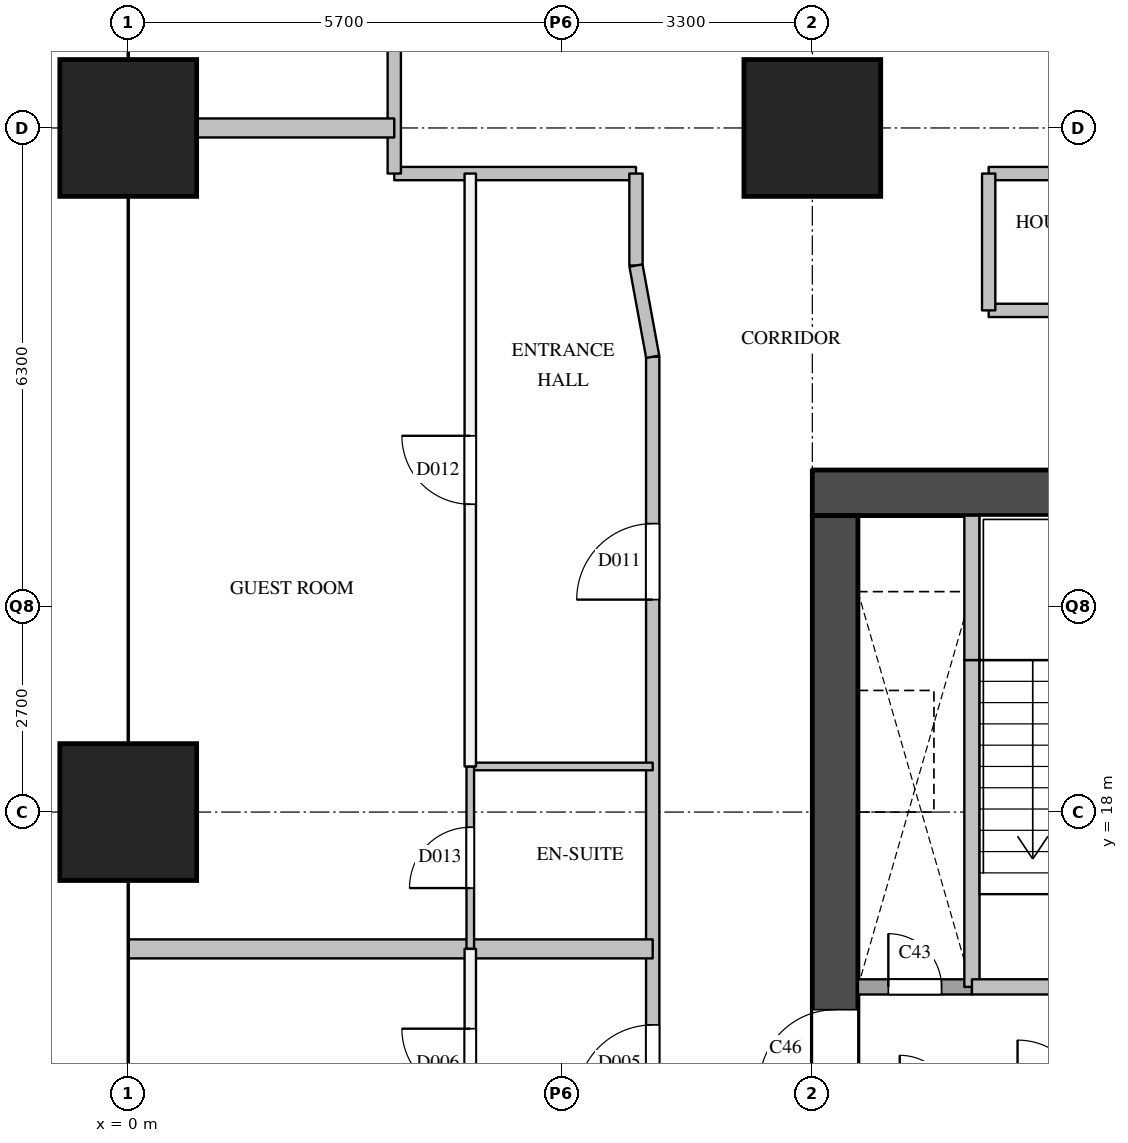
"""IFC4 building model, lengths in metres.
Left out: names, types, materials, properties, quantities, classifications, styles, units other than length and angle.
Written with IfcOpenShell. Run it as: python <this file> out.ifc"""

import sys

from ifc_helpers import new_model, si_unit, direction, frame, frame_2d, origin, origin_2d, place, context, subcontext, project, spatial, rectangle, extrude, element, fill, save


model = new_model("IFC4")
c1 = context("Model", 3, precision=1e-05, world=origin(), true_north=direction((0.0, 1.0)))
c2 = subcontext(c1, "Body", "Model", "MODEL_VIEW")
j1 = project(units=[si_unit("LENGTHUNIT", "METRE"), si_unit("PLANEANGLEUNIT", "RADIAN")], contexts=[c1])
p1 = place(None, origin())
s1 = spatial("IfcSite", under=j1, at=p1, CompositionType="ELEMENT")
p2 = place(p1, origin())
s2 = spatial("IfcBuilding", under=s1, at=p2, CompositionType="ELEMENT")
p3 = place(p2, frame((0.0, 0.0, 61.4)))
s3 = spatial("IfcBuildingStorey", under=s2, at=p3, CompositionType="ELEMENT", Elevation=61.4)
for number, where, z_axis, x_axis in (
    (1, (0.0, 18.0, 0.0), (0.0, 0.0, 1.0), (1.0, 0.0, 0.0)),
    (2, (0.0, 27.0, 0.0), (0.0, 0.0, 1.0), (1.0, 0.0, 0.0)),
    (3, (9.0, 27.0, 0.0), (0.0, 0.0, 1.0), (1.0, 0.0, 0.0)),
):
    element("IfcColumn", number, at=place(p3, frame(where, z_axis=z_axis, x_axis=x_axis)), inside=s3, PredefinedType="COLUMN", context=c2, shape_type="SweptSolid", body=[
        extrude(rectangle(XDim=1.8, YDim=1.8, at=origin_2d()), origin(), (0.0, 0.0, 1.0), 3.8),
    ])
p4 = place(p3, frame((9.0, 22.2, 0.0), z_axis=(0.0, 0.0, 1.0), x_axis=(1.0, 0.0, 0.0)))
e4 = element("IfcWall", 4, at=p4, inside=s3, PredefinedType="SHEAR", context=c2, shape_type="SweptSolid", body=[
    extrude(rectangle(XDim=9.0, YDim=0.6, at=frame_2d((4.5, 0.0))), origin(), (0.0, 0.0, 1.0), 3.5),
])
p5 = place(p3, frame((9.3, 9.6, 0.0), z_axis=(0.0, 0.0, 1.0), x_axis=(0.0, 1.0, 0.0)))
e5 = element("IfcWall", 5, at=p5, inside=s3, PredefinedType="SHEAR", context=c2, shape_type="SweptSolid", body=[
    extrude(rectangle(XDim=12.3, YDim=0.6, at=frame_2d((6.15, 0.0))), origin(), (0.0, 0.0, 1.0), 3.5),
])
p6 = place(p5, frame((0.8, 0.0, 0.0)))
e6 = element("IfcOpeningElement", 6, at=p6, cuts=e5, PredefinedType="OPENING", context=c2, shape_type="SweptSolid", body=[
    extrude(rectangle(XDim=0.7, YDim=2.1, at=frame_2d((0.35, 1.05))), frame((0.0, 0.31, 0.0), z_axis=(0.0, -1.0, 0.0), x_axis=(1.0, 0.0, 0.0)), (0.0, 0.0, 1.0), 0.62),
])
p7 = place(p5, frame((4.8, 0.0, 0.0)))
e7 = element("IfcOpeningElement", 7, at=p7, cuts=e5, PredefinedType="OPENING", context=c2, shape_type="SweptSolid", body=[
    extrude(rectangle(XDim=1.0, YDim=2.1, at=frame_2d((0.5, 1.05))), frame((0.0, 0.31, 0.0), z_axis=(0.0, -1.0, 0.0), x_axis=(1.0, 0.0, 0.0)), (0.0, 0.0, 1.0), 0.62),
])
p8 = place(p3, frame((11.1, 15.7, 0.0), z_axis=(0.0, 0.0, 1.0), x_axis=(0.0, 1.0, 0.0)))
e8 = element("IfcWall", 8, at=p8, inside=s3, PredefinedType="SOLIDWALL", context=c2, shape_type="SweptSolid", body=[
    extrude(rectangle(XDim=4.3, YDim=0.2, at=frame_2d((2.15, 0.0))), origin(), (0.0, 0.0, 1.0), 3.5),
])
p9 = place(p3, frame((11.1, 20.0, 0.0), z_axis=(0.0, 0.0, 1.0), x_axis=(0.0, 1.0, 0.0)))
e9 = element("IfcWall", 9, at=p9, inside=s3, PredefinedType="SOLIDWALL", context=c2, shape_type="SweptSolid", body=[
    extrude(rectangle(XDim=1.9, YDim=0.2, at=frame_2d((0.95, 0.0))), origin(), (0.0, 0.0, 1.0), 3.5),
])
p10 = place(p3, frame((9.6, 15.7, 0.0), z_axis=(0.0, 0.0, 1.0), x_axis=(1.0, 0.0, 0.0)))
e10 = element("IfcWall", 10, at=p10, inside=s3, PredefinedType="SOLIDWALL", context=c2, shape_type="SweptSolid", body=[
    extrude(rectangle(XDim=1.5, YDim=0.2, at=frame_2d((0.75, 0.0))), origin(), (0.0, 0.0, 1.0), 3.5),
])
p11 = place(p10, frame((0.4, 0.0, 0.0)))
e11 = element("IfcOpeningElement", 11, at=p11, cuts=e10, PredefinedType="OPENING", context=c2, shape_type="SweptSolid", body=[
    extrude(rectangle(XDim=0.7, YDim=2.1, at=frame_2d((0.35, 1.05))), frame((0.0, 0.11, 0.0), z_axis=(0.0, -1.0, 0.0), x_axis=(1.0, 0.0, 0.0)), (0.0, 0.0, 1.0), 0.22),
])
p12 = place(p3, frame((11.1, 15.7, 0.0), z_axis=(0.0, 0.0, 1.0), x_axis=(1.0, 0.0, 0.0)))
e12 = element("IfcWall", 12, at=p12, inside=s3, PredefinedType="SOLIDWALL", context=c2, shape_type="SweptSolid", body=[
    extrude(rectangle(XDim=6.3, YDim=0.2, at=frame_2d((3.15, 0.0))), origin(), (0.0, 0.0, 1.0), 3.5),
])
p13 = place(p12, frame((4.175, 0.0, 0.0)))
e13 = element("IfcOpeningElement", 13, at=p13, cuts=e12, PredefinedType="OPENING", context=c2, shape_type="SweptSolid", body=[
    extrude(rectangle(XDim=1.1, YDim=2.1, at=frame_2d((0.55, 1.05))), frame((0.0, 0.11, 0.0), z_axis=(0.0, -1.0, 0.0), x_axis=(1.0, 0.0, 0.0)), (0.0, 0.0, 1.0), 0.22),
])
p14 = place(p12, frame((1.025, 0.0, 0.0)))
e14 = element("IfcOpeningElement", 14, at=p14, cuts=e12, PredefinedType="OPENING", context=c2, shape_type="SweptSolid", body=[
    extrude(rectangle(XDim=1.1, YDim=2.1, at=frame_2d((0.55, 1.05))), frame((0.0, 0.11, 0.0), z_axis=(0.0, -1.0, 0.0), x_axis=(1.0, 0.0, 0.0)), (0.0, 0.0, 1.0), 0.22),
])
p15 = place(p3, frame((11.32, 24.6, 0.0), z_axis=(0.0, 0.0, 1.0), x_axis=(1.0, 0.0, 0.0)))
e15 = element("IfcWall", 15, at=p15, inside=s3, PredefinedType="PARTITIONING", context=c2, shape_type="SweptSolid", body=[
    extrude(rectangle(XDim=4.36, YDim=0.175, at=frame_2d((2.18, 0.0))), origin(), (0.0, 0.0, 1.0), 3.5),
])
p16 = place(p15, frame((1.68, 0.0, 0.0)))
e16 = element("IfcOpeningElement", 16, at=p16, cuts=e15, PredefinedType="OPENING", context=c2, shape_type="SweptSolid", body=[
    extrude(rectangle(XDim=1.0, YDim=2.1, at=frame_2d((0.5, 1.05))), frame((0.0, 0.097, 0.0), z_axis=(0.0, -1.0, 0.0), x_axis=(1.0, 0.0, 0.0)), (0.0, 0.0, 1.0), 0.195),
])
p17 = place(p3, frame((3.5, 26.4, 0.0), z_axis=(0.0, 0.0, 1.0), x_axis=(1.0, 0.0, 0.0)))
e17 = element("IfcWall", 17, at=p17, inside=s3, PredefinedType="PARTITIONING", context=c2, shape_type="SweptSolid", body=[
    extrude(rectangle(XDim=3.18, YDim=0.175, at=frame_2d((1.59, 0.0))), origin(), (0.0, 0.0, 1.0), 3.5),
])
p18 = place(p3, frame((11.32, 26.4, 0.0), z_axis=(0.0, 0.0, 1.0), x_axis=(1.0, 0.0, 0.0)))
e18 = element("IfcWall", 18, at=p18, inside=s3, PredefinedType="PARTITIONING", context=c2, shape_type="SweptSolid", body=[
    extrude(rectangle(XDim=4.36, YDim=0.175, at=frame_2d((2.18, 0.0))), origin(), (0.0, 0.0, 1.0), 3.5),
])
p19 = place(p3, frame((3.5, 26.4, 0.0), z_axis=(0.0, 0.0, 1.0), x_axis=(0.0, 1.0, 0.0)))
e19 = element("IfcWall", 19, at=p19, inside=s3, PredefinedType="PARTITIONING", context=c2, shape_type="SweptSolid", body=[
    extrude(rectangle(XDim=25.7, YDim=0.175, at=frame_2d((12.85, 0.0))), origin(), (0.0, 0.0, 1.0), 2.5),
])
p20 = place(p19, frame((12.7, 0.0, 0.0)))
e20 = element("IfcOpeningElement", 20, at=p20, cuts=e19, PredefinedType="OPENING", context=c2, shape_type="SweptSolid", body=[
    extrude(rectangle(XDim=0.9, YDim=2.1, at=frame_2d((0.45, 1.05))), frame((0.0, 0.097, 0.0), z_axis=(0.0, -1.0, 0.0), x_axis=(1.0, 0.0, 0.0)), (0.0, 0.0, 1.0), 0.195),
])
p21 = place(p3, frame((6.68, 25.19, 0.0), z_axis=(0.0, 0.0, 1.0), x_axis=(0.0, 1.0, 0.0)))
e21 = element("IfcWall", 21, at=p21, inside=s3, PredefinedType="PARTITIONING", context=c2, shape_type="SweptSolid", body=[
    extrude(rectangle(XDim=1.21, YDim=0.175, at=frame_2d((0.605, 0.0))), origin(), (0.0, 0.0, 1.0), 3.5),
])
p22 = place(p3, frame((6.9, 6.9, 0.0), z_axis=(0.0, 0.0, 1.0), x_axis=(0.0, 1.0, 0.0)))
e22 = element("IfcWall", 22, at=p22, inside=s3, PredefinedType="PARTITIONING", context=c2, shape_type="SweptSolid", body=[
    extrude(rectangle(XDim=17.09, YDim=0.175, at=frame_2d((8.545, 0.0))), origin(), (0.0, 0.0, 1.0), 3.5),
])
p23 = place(p22, frame((7.3, 0.0, 0.0)))
e23 = element("IfcOpeningElement", 23, at=p23, cuts=e22, PredefinedType="OPENING", context=c2, shape_type="SweptSolid", body=[
    extrude(rectangle(XDim=1.0, YDim=2.1, at=frame_2d((0.5, 1.05))), frame((0.0, 0.097, 0.0), z_axis=(0.0, -1.0, 0.0), x_axis=(1.0, 0.0, 0.0)), (0.0, 0.0, 1.0), 0.195),
])
p24 = place(p22, frame((13.895, 0.0, 0.0)))
e24 = element("IfcOpeningElement", 24, at=p24, cuts=e22, PredefinedType="OPENING", context=c2, shape_type="SweptSolid", body=[
    extrude(rectangle(XDim=1.0, YDim=2.1, at=frame_2d((0.5, 1.05))), frame((0.0, 0.097, 0.0), z_axis=(0.0, -1.0, 0.0), x_axis=(1.0, 0.0, 0.0)), (0.0, 0.0, 1.0), 0.195),
])
p25 = place(p3, frame((11.32, 24.6, 0.0), z_axis=(0.0, 0.0, 1.0), x_axis=(0.0, 1.0, 0.0)))
e25 = element("IfcWall", 25, at=p25, inside=s3, PredefinedType="PARTITIONING", context=c2, shape_type="SweptSolid", body=[
    extrude(rectangle(XDim=1.8, YDim=0.175, at=frame_2d((0.9, 0.0))), origin(), (0.0, 0.0, 1.0), 3.5),
])
p26 = place(p3, frame((4.5, 13.2, 0.0), z_axis=(0.0, 0.0, 1.0), x_axis=(0.0, 1.0, 0.0)))
e26 = element("IfcWall", 26, at=p26, inside=s3, PredefinedType="PARTITIONING", context=c2, shape_type="SweptSolid", body=[
    extrude(rectangle(XDim=3.0, YDim=0.15, at=frame_2d((1.5, 0.0))), origin(), (0.0, 0.0, 1.0), 3.5),
])
p27 = place(p26, frame((1.05, 0.0, 0.0)))
e27 = element("IfcOpeningElement", 27, at=p27, cuts=e26, PredefinedType="OPENING", context=c2, shape_type="SweptSolid", body=[
    extrude(rectangle(XDim=0.9, YDim=2.1, at=frame_2d((0.45, 1.05))), frame((0.0, 0.085, 0.0), z_axis=(0.0, -1.0, 0.0), x_axis=(1.0, 0.0, 0.0)), (0.0, 0.0, 1.0), 0.17),
])
p28 = place(p3, frame((4.5, 18.6, 0.0), z_axis=(0.0, 0.0, 1.0), x_axis=(0.0, 1.0, 0.0)))
e28 = element("IfcWall", 28, at=p28, inside=s3, PredefinedType="PARTITIONING", context=c2, shape_type="SweptSolid", body=[
    extrude(rectangle(XDim=7.8, YDim=0.15, at=frame_2d((3.9, 0.0))), origin(), (0.0, 0.0, 1.0), 3.5),
])
p29 = place(p28, frame((3.45, 0.0, 0.0)))
e29 = element("IfcOpeningElement", 29, at=p29, cuts=e28, PredefinedType="OPENING", context=c2, shape_type="SweptSolid", body=[
    extrude(rectangle(XDim=0.9, YDim=2.1, at=frame_2d((0.45, 1.05))), frame((0.0, 0.085, 0.0), z_axis=(0.0, -1.0, 0.0), x_axis=(1.0, 0.0, 0.0)), (0.0, 0.0, 1.0), 0.17),
])
p30 = place(p3, frame((0.0, 16.2, 0.0), z_axis=(0.0, 0.0, 1.0), x_axis=(1.0, 0.0, 0.0)))
e30 = element("IfcWall", 30, at=p30, inside=s3, PredefinedType="PARTITIONING", context=c2, shape_type="SweptSolid", body=[
    extrude(rectangle(XDim=6.9, YDim=0.25, at=frame_2d((3.45, 0.0))), origin(), (0.0, 0.0, 1.0), 2.5),
])
p31 = place(p3, frame((0.0, 27.0, 0.0), z_axis=(0.0, 0.0, 1.0), x_axis=(1.0, 0.0, 0.0)))
e31 = element("IfcWall", 31, at=p31, inside=s3, PredefinedType="PARTITIONING", context=c2, shape_type="SweptSolid", body=[
    extrude(rectangle(XDim=3.5, YDim=0.25, at=frame_2d((1.75, 0.0))), origin(), (0.0, 0.0, 1.0), 2.5),
])
p32 = place(p3, frame((4.5, 18.6, 0.0), z_axis=(0.0, 0.0, 1.0), x_axis=(1.0, 0.0, 0.0)))
e32 = element("IfcWall", 32, at=p32, inside=s3, PredefinedType="PARTITIONING", context=c2, shape_type="SweptSolid", body=[
    extrude(rectangle(XDim=2.4, YDim=0.1, at=frame_2d((1.2, 0.0))), origin(), (0.0, 0.0, 1.0), 3.5),
])
p33 = place(p3, frame((4.5, 16.2, 0.0), z_axis=(0.0, 0.0, 1.0), x_axis=(0.0, 1.0, 0.0)))
e33 = element("IfcWall", 33, at=p33, inside=s3, PredefinedType="PARTITIONING", context=c2, shape_type="SweptSolid", body=[
    extrude(rectangle(XDim=2.4, YDim=0.1, at=frame_2d((1.2, 0.0))), origin(), (0.0, 0.0, 1.0), 3.5),
])
p34 = place(p33, frame((0.8, 0.0, 0.0)))
e34 = element("IfcOpeningElement", 34, at=p34, cuts=e33, PredefinedType="OPENING", context=c2, shape_type="SweptSolid", body=[
    extrude(rectangle(XDim=0.8, YDim=2.1, at=frame_2d((0.4, 1.05))), frame((0.0, 0.06, 0.0), z_axis=(0.0, -1.0, 0.0), x_axis=(1.0, 0.0, 0.0)), (0.0, 0.0, 1.0), 0.12),
])
p35 = place(p3, frame((6.9, 23.99, 0.0), z_axis=(0.0, 0.0, 1.0), x_axis=(-0.180311734132, 0.983609515272, 0.0)))
e35 = element("IfcWall", 35, at=p35, inside=s3, PredefinedType="PARTITIONING", context=c2, shape_type="SweptSolid", body=[
    extrude(rectangle(XDim=1.22, YDim=0.175, at=frame_2d((0.61, 0.0))), origin(), (0.0, 0.0, 1.0), 3.5),
])
p36 = place(p11, origin())
e36 = element("IfcDoor", 36, at=p36, inside=s3, OperationType="SINGLE_SWING_LEFT", PredefinedType="DOOR", context=c2, shape_type="SweptSolid", body=[
    extrude(rectangle(XDim=0.7, YDim=2.1, at=frame_2d((0.35, 1.05))), frame((0.0, 0.025, 0.0), z_axis=(0.0, -1.0, 0.0), x_axis=(1.0, 0.0, 0.0)), (0.0, 0.0, 1.0), 0.05),
])
fill(e11, e36)
p37 = place(p7, origin())
e37 = element("IfcDoor", 37, at=p37, inside=s3, OperationType="SINGLE_SWING_LEFT", PredefinedType="DOOR", context=c2, shape_type="SweptSolid", body=[
    extrude(rectangle(XDim=1.0, YDim=2.1, at=frame_2d((0.5, 1.05))), frame((0.0, 0.025, 0.0), z_axis=(0.0, -1.0, 0.0), x_axis=(1.0, 0.0, 0.0)), (0.0, 0.0, 1.0), 0.05),
])
fill(e7, e37)
p38 = place(p23, origin())
e38 = element("IfcDoor", 38, at=p38, inside=s3, OperationType="SINGLE_SWING_LEFT", PredefinedType="DOOR", context=c2, shape_type="SweptSolid", body=[
    extrude(rectangle(XDim=1.0, YDim=2.1, at=frame_2d((0.5, 1.05))), frame((0.0, 0.025, 0.0), z_axis=(0.0, -1.0, 0.0), x_axis=(1.0, 0.0, 0.0)), (0.0, 0.0, 1.0), 0.05),
])
fill(e23, e38)
p39 = place(p27, origin())
e39 = element("IfcDoor", 39, at=p39, inside=s3, OperationType="SINGLE_SWING_RIGHT", PredefinedType="DOOR", context=c2, shape_type="SweptSolid", body=[
    extrude(rectangle(XDim=0.9, YDim=2.1, at=frame_2d((0.45, 1.05))), frame((0.0, 0.025, 0.0), z_axis=(0.0, -1.0, 0.0), x_axis=(1.0, 0.0, 0.0)), (0.0, 0.0, 1.0), 0.05),
])
fill(e27, e39)
p40 = place(p24, origin())
e40 = element("IfcDoor", 40, at=p40, inside=s3, OperationType="SINGLE_SWING_LEFT", PredefinedType="DOOR", context=c2, shape_type="SweptSolid", body=[
    extrude(rectangle(XDim=1.0, YDim=2.1, at=frame_2d((0.5, 1.05))), frame((0.0, 0.025, 0.0), z_axis=(0.0, -1.0, 0.0), x_axis=(1.0, 0.0, 0.0)), (0.0, 0.0, 1.0), 0.05),
])
fill(e24, e40)
p41 = place(p29, origin())
e41 = element("IfcDoor", 41, at=p41, inside=s3, OperationType="SINGLE_SWING_RIGHT", PredefinedType="DOOR", context=c2, shape_type="SweptSolid", body=[
    extrude(rectangle(XDim=0.9, YDim=2.1, at=frame_2d((0.45, 1.05))), frame((0.0, 0.025, 0.0), z_axis=(0.0, -1.0, 0.0), x_axis=(1.0, 0.0, 0.0)), (0.0, 0.0, 1.0), 0.05),
])
fill(e29, e41)
p42 = place(p34, origin())
e42 = element("IfcDoor", 42, at=p42, inside=s3, OperationType="SINGLE_SWING_LEFT", PredefinedType="DOOR", context=c2, shape_type="SweptSolid", body=[
    extrude(rectangle(XDim=0.8, YDim=2.1, at=frame_2d((0.4, 1.05))), frame((0.0, 0.025, 0.0), z_axis=(0.0, -1.0, 0.0), x_axis=(1.0, 0.0, 0.0)), (0.0, 0.0, 1.0), 0.05),
])
fill(e34, e42)
save(model, sys.argv[1])
